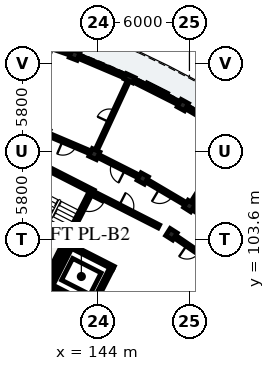
"""IFC4 building model, lengths in metres.
Left out: names, types, materials, properties, quantities, classifications, styles, units other than length and angle.
Written with IfcOpenShell. Run it as: python <this file> out.ifc"""

import sys

from ifc_helpers import new_model, si_unit, direction, frame, frame_2d, origin, origin_2d, place, context, subcontext, project, spatial, rectangle, extrude, element, fill, save


model = new_model("IFC4")
c1 = context("Model", 3, precision=1e-05, world=origin(), true_north=direction((0.0, 1.0)))
c2 = subcontext(c1, "Body", "Model", "MODEL_VIEW")
j1 = project(units=[si_unit("LENGTHUNIT", "METRE"), si_unit("PLANEANGLEUNIT", "RADIAN")], contexts=[c1])
p1 = place(None, origin())
s1 = spatial("IfcSite", under=j1, at=p1, CompositionType="ELEMENT")
p2 = place(p1, origin())
s2 = spatial("IfcBuilding", under=s1, at=p2, CompositionType="ELEMENT")
p3 = place(p2, frame((0.0, 0.0, 15.56)))
s3 = spatial("IfcBuildingStorey", under=s2, at=p3, CompositionType="ELEMENT", Elevation=15.56)
p4 = place(p3, frame((140.629, 108.307, 0.0), z_axis=(0.0, 0.0, 1.0), x_axis=(0.891032414707, -0.453939683153, 0.0)))
e1 = element("IfcWall", 1, at=p4, inside=s3, PredefinedType="SHEAR", context=c2, shape_type="SweptSolid", body=[
    extrude(rectangle(XDim=3.42, YDim=0.25, at=frame_2d((1.71, 0.0))), origin(), (0.0, 0.0, 1.0), 3.11),
])
p5 = place(p3, frame((143.509, 106.699, 0.0), z_axis=(0.0, 0.0, 1.0), x_axis=(-0.453992276384, -0.891005618941, 0.0)))
e2 = element("IfcWall", 2, at=p5, inside=s3, PredefinedType="SHEAR", context=c2, shape_type="SweptSolid", body=[
    extrude(rectangle(XDim=6.6, YDim=0.25, at=frame_2d((3.3, 0.0))), origin(), (0.0, 0.0, 1.0), 3.11),
])
p6 = place(p5, frame((0.22, 0.0, 0.0)))
e3 = element("IfcOpeningElement", 3, at=p6, cuts=e2, PredefinedType="OPENING", context=c2, shape_type="SweptSolid", body=[
    extrude(rectangle(XDim=1.05, YDim=2.15, at=frame_2d((0.525, 1.075))), frame((0.0, 0.135, 0.0), z_axis=(0.0, -1.0, 0.0), x_axis=(1.0, 0.0, 0.0)), (0.0, 0.0, 1.0), 0.27),
])
p7 = place(p3, frame((142.103, 103.224, 0.0), z_axis=(0.0, 0.0, 1.0), x_axis=(0.891001200497, -0.454000947921, 0.0)))
e4 = element("IfcWall", 4, at=p7, inside=s3, PredefinedType="SHEAR", context=c2, shape_type="SweptSolid", body=[
    extrude(rectangle(XDim=3.26, YDim=0.23, at=frame_2d((1.63, 0.0))), origin(), (0.0, 0.0, 1.0), 3.11),
])
p8 = place(p7, frame((0.9, 0.0, 0.0)))
e5 = element("IfcOpeningElement", 5, at=p8, cuts=e4, PredefinedType="OPENING", context=c2, shape_type="SweptSolid", body=[
    extrude(rectangle(XDim=1.0, YDim=2.15, at=frame_2d((0.5, 1.075))), frame((0.0, 0.125, 0.0), z_axis=(0.0, -1.0, 0.0), x_axis=(1.0, 0.0, 0.0)), (0.0, 0.0, 1.0), 0.25),
])
p9 = place(p3, frame((140.772, 100.613, 0.0), z_axis=(0.0, 0.0, 1.0), x_axis=(0.891016635648, -0.453970654337, 0.0)))
e6 = element("IfcWall", 6, at=p9, inside=s3, PredefinedType="SHEAR", context=c2, shape_type="SweptSolid", body=[
    extrude(rectangle(XDim=3.26, YDim=0.23, at=frame_2d((1.63, 0.0))), origin(), (0.0, 0.0, 1.0), 3.11),
])
for number, where, z_axis, x_axis in (
    (7, (142.153, 103.069, 0.0), (0.0, 0.0, 1.0), (-0.454, -0.891, 0.0)),
    (8, (144.853, 101.694, 0.0), (0.0, 0.0, 1.0), (-0.454, -0.891, 0.0)),
):
    element("IfcWall", number, at=place(p3, frame(where, z_axis=z_axis, x_axis=x_axis)), inside=s3, PredefinedType="SHEAR", context=c2, shape_type="SweptSolid", body=[
        extrude(rectangle(XDim=2.7, YDim=0.23, at=frame_2d((1.35, 0.0))), origin(), (0.0, 0.0, 1.0), 3.11),
    ])
for number, where, z_axis, x_axis in (
    (9, (148.817, 103.957, 0.0), (0.0, 0.0, 1.0), (0.536, 0.844, 0.0)),
    (10, (149.997, 105.813, 0.0), (0.0, 0.0, 1.0), (0.536, 0.844, 0.0)),
    (11, (146.928, 107.625, 0.0), (0.0, 0.0, 1.0), (0.48, 0.877, 0.0)),
    (12, (149.567, 112.451, 0.0), (0.0, 0.0, 1.0), (0.48, 0.877, 0.0)),
    (13, (143.748, 109.23, 0.0), (0.0, 0.0, 1.0), (0.421, 0.907, 0.0)),
):
    element("IfcColumn", number, at=place(p3, frame(where, z_axis=z_axis, x_axis=x_axis)), inside=s3, PredefinedType="COLUMN", context=c2, shape_type="SweptSolid", body=[
        extrude(rectangle(XDim=0.55, YDim=0.55, at=origin_2d()), origin(), (0.0, 0.0, 1.0), 3.11),
    ])
p10 = place(p3, frame((146.062, 114.219, 0.0), z_axis=(0.0, 0.0, 1.0), x_axis=(0.420859860775, 0.907125668024, 0.0)))
e14 = element("IfcColumn", 14, at=p10, inside=s3, PredefinedType="PILASTER", context=c2, shape_type="SweptSolid", body=[
    extrude(rectangle(XDim=0.38, YDim=0.62, at=origin_2d()), origin(), (0.0, 0.0, 1.0), 3.11),
])
p11 = place(p3, frame((142.448, 115.753, 0.0), z_axis=(0.0, 0.0, 1.0), x_axis=(0.36017767415, 0.932883724289, 0.0)))
e15 = element("IfcColumn", 15, at=p11, inside=s3, PredefinedType="COLUMN", context=c2, shape_type="SweptSolid", body=[
    extrude(rectangle(XDim=0.55, YDim=0.55, at=origin_2d()), origin(), (0.0, 0.0, 1.0), 3.11),
])
p12 = place(p3, frame((152.81, 110.536, 0.0), z_axis=(0.0, 0.0, 1.0), x_axis=(-0.861136297738, 0.508374150324, 0.0)))
e16 = element("IfcWall", 16, at=p12, inside=s3, PredefinedType="SOLIDWALL", context=c2, shape_type="SweptSolid", body=[
    extrude(rectangle(XDim=3.521, YDim=0.24, at=frame_2d((1.76, 0.0))), origin(), (0.0, 0.0, 1.0), 2.355),
])
p13 = place(p12, frame((1.035, 0.0, 0.35)))
e17 = element("IfcOpeningElement", 17, at=p13, cuts=e16, PredefinedType="OPENING", context=c2, shape_type="SweptSolid", body=[
    extrude(rectangle(XDim=1.45, YDim=1.7, at=frame_2d((0.725, 0.85))), frame((0.0, 0.13, 0.0), z_axis=(0.0, -1.0, 0.0), x_axis=(1.0, 0.0, 0.0)), (0.0, 0.0, 1.0), 0.26),
])
p14 = place(p3, frame((149.348, 112.561, 0.0), z_axis=(0.0, 0.0, 1.0), x_axis=(-0.892756700232, 0.450539092855, 0.0)))
e18 = element("IfcWall", 18, at=p14, inside=s3, PredefinedType="SOLIDWALL", context=c2, shape_type="SweptSolid", body=[
    extrude(rectangle(XDim=3.521, YDim=0.24, at=frame_2d((1.76, 0.0))), origin(), (0.0, 0.0, 1.0), 2.355),
])
p15 = place(p14, frame((0.96, 0.0, 0.35)))
e19 = element("IfcOpeningElement", 19, at=p15, cuts=e18, PredefinedType="OPENING", context=c2, shape_type="SweptSolid", body=[
    extrude(rectangle(XDim=1.6, YDim=1.75, at=frame_2d((0.8, 0.875))), frame((0.0, 0.13, 0.0), z_axis=(0.0, -1.0, 0.0), x_axis=(1.0, 0.0, 0.0)), (0.0, 0.0, 1.0), 0.26),
])
p16 = place(p3, frame((145.915, 114.282, 0.0), z_axis=(0.0, 0.0, 1.0), x_axis=(-0.920502438884, 0.390736816807, 0.0)))
e20 = element("IfcWall", 20, at=p16, inside=s3, PredefinedType="SOLIDWALL", context=c2, shape_type="SweptSolid", body=[
    extrude(rectangle(XDim=3.521, YDim=0.24, at=frame_2d((1.76, 0.0))), origin(), (0.0, 0.0, 1.0), 2.355),
])
p17 = place(p16, frame((0.885, 0.0, 0.35)))
e21 = element("IfcOpeningElement", 21, at=p17, cuts=e20, PredefinedType="OPENING", context=c2, shape_type="SweptSolid", body=[
    extrude(rectangle(XDim=1.75, YDim=1.85, at=frame_2d((0.875, 0.925))), frame((0.0, 0.13, 0.0), z_axis=(0.0, -1.0, 0.0), x_axis=(1.0, 0.0, 0.0)), (0.0, 0.0, 1.0), 0.26),
])
p18 = place(p3, frame((142.217, 115.834, 0.0), z_axis=(0.0, 0.0, 1.0), x_axis=(-0.944267366677, 0.329179495455, 0.0)))
e22 = element("IfcWall", 22, at=p18, inside=s3, PredefinedType="SOLIDWALL", context=c2, shape_type="SweptSolid", body=[
    extrude(rectangle(XDim=3.521, YDim=0.24, at=frame_2d((1.76, 0.0))), origin(), (0.0, 0.0, 1.0), 2.355),
])
p19 = place(p18, frame((1.25, 0.0, 0.0)))
e23 = element("IfcOpeningElement", 23, at=p19, cuts=e22, PredefinedType="OPENING", context=c2, shape_type="SweptSolid", body=[
    extrude(rectangle(XDim=1.02, YDim=2.14, at=frame_2d((0.51, 1.07))), frame((0.0, 0.13, 0.0), z_axis=(0.0, -1.0, 0.0), x_axis=(1.0, 0.0, 0.0)), (0.0, 0.0, 1.0), 0.26),
])
p20 = place(p3, frame((143.625, 106.696, 0.0), z_axis=(0.0, 0.0, 1.0), x_axis=(0.891003372311, -0.453996685595, 0.0)))
e24 = element("IfcWall", 24, at=p20, inside=s3, PredefinedType="PARTITIONING", context=c2, shape_type="SweptSolid", body=[
    extrude(rectangle(XDim=4.9, YDim=0.22, at=frame_2d((2.45, 0.0))), origin(), (0.0, 0.0, 1.0), 2.34),
])
p21 = place(p20, frame((1.95, 0.0, 0.0)))
e25 = element("IfcOpeningElement", 25, at=p21, cuts=e24, PredefinedType="OPENING", context=c2, shape_type="SweptSolid", body=[
    extrude(rectangle(XDim=0.98, YDim=2.14, at=frame_2d((0.49, 1.07))), frame((0.0, 0.12, 0.0), z_axis=(0.0, -1.0, 0.0), x_axis=(1.0, 0.0, 0.0)), (0.0, 0.0, 1.0), 0.24),
])
p22 = place(p3, frame((152.65, 104.001, 0.0), z_axis=(0.0, 0.0, 1.0), x_axis=(-0.825779671787, 0.563992848947, 0.0)))
e26 = element("IfcWall", 26, at=p22, inside=s3, PredefinedType="PARTITIONING", context=c2, shape_type="SweptSolid", body=[
    extrude(rectangle(XDim=2.863, YDim=0.205, at=frame_2d((1.432, 0.0))), origin(), (0.0, 0.0, 1.0), 2.37),
])
p23 = place(p22, frame((0.967, 0.0, 0.0)))
e27 = element("IfcOpeningElement", 27, at=p23, cuts=e26, PredefinedType="OPENING", context=c2, shape_type="SweptSolid", body=[
    extrude(rectangle(XDim=0.93, YDim=2.12, at=frame_2d((0.465, 1.06))), frame((0.0, 0.113, 0.0), z_axis=(0.0, -1.0, 0.0), x_axis=(1.0, 0.0, 0.0)), (0.0, 0.0, 1.0), 0.225),
])
p24 = place(p3, frame((151.35, 102.226, 0.0), z_axis=(0.0, 0.0, 1.0), x_axis=(-0.825752009056, 0.56403334967, 0.0)))
e28 = element("IfcWall", 28, at=p24, inside=s3, PredefinedType="PARTITIONING", context=c2, shape_type="SweptSolid", body=[
    extrude(rectangle(XDim=2.718, YDim=0.205, at=frame_2d((1.359, 0.0))), origin(), (0.0, 0.0, 1.0), 2.37),
])
p25 = place(p24, frame((0.894, 0.0, 0.0)))
e29 = element("IfcOpeningElement", 29, at=p25, cuts=e28, PredefinedType="OPENING", context=c2, shape_type="SweptSolid", body=[
    extrude(rectangle(XDim=0.93, YDim=2.12, at=frame_2d((0.465, 1.06))), frame((0.0, 0.113, 0.0), z_axis=(0.0, -1.0, 0.0), x_axis=(1.0, 0.0, 0.0)), (0.0, 0.0, 1.0), 0.225),
])
p26 = place(p3, frame((150.211, 106.151, 0.0), z_axis=(0.0, 0.0, 1.0), x_axis=(0.536492262982, 0.843905238614, 0.0)))
e30 = element("IfcWall", 30, at=p26, inside=s3, PredefinedType="PARTITIONING", context=c2, shape_type="SweptSolid", body=[
    extrude(rectangle(XDim=4.7, YDim=0.125, at=frame_2d((2.35, 0.0))), origin(), (0.0, 0.0, 1.0), 2.37),
])
p27 = place(p26, frame((1.915, 0.0, 0.0)))
e31 = element("IfcOpeningElement", 31, at=p27, cuts=e30, PredefinedType="OPENING", context=c2, shape_type="SweptSolid", body=[
    extrude(rectangle(XDim=0.87, YDim=2.08, at=frame_2d((0.435, 1.04))), frame((0.0, 0.073, 0.0), z_axis=(0.0, -1.0, 0.0), x_axis=(1.0, 0.0, 0.0)), (0.0, 0.0, 1.0), 0.145),
])
p28 = place(p3, frame((149.695, 105.991, 0.0), z_axis=(0.0, 0.0, 1.0), x_axis=(-0.861113214678, 0.508413248753, 0.0)))
e32 = element("IfcWall", 32, at=p28, inside=s3, PredefinedType="PARTITIONING", context=c2, shape_type="SweptSolid", body=[
    extrude(rectangle(XDim=2.863, YDim=0.205, at=frame_2d((1.432, 0.0))), origin(), (0.0, 0.0, 1.0), 2.37),
])
p29 = place(p28, frame((0.937, 0.0, 0.0)))
e33 = element("IfcOpeningElement", 33, at=p29, cuts=e32, PredefinedType="OPENING", context=c2, shape_type="SweptSolid", body=[
    extrude(rectangle(XDim=0.99, YDim=2.16, at=frame_2d((0.495, 1.08))), frame((0.0, 0.113, 0.0), z_axis=(0.0, -1.0, 0.0), x_axis=(1.0, 0.0, 0.0)), (0.0, 0.0, 1.0), 0.225),
])
p30 = place(p3, frame((146.616, 107.782, 0.0), z_axis=(0.0, 0.0, 1.0), x_axis=(-0.89273239336, 0.450587254419, 0.0)))
e34 = element("IfcWall", 34, at=p30, inside=s3, PredefinedType="PARTITIONING", context=c2, shape_type="SweptSolid", body=[
    extrude(rectangle(XDim=2.863, YDim=0.205, at=frame_2d((1.432, 0.0))), origin(), (0.0, 0.0, 1.0), 2.37),
])
p31 = place(p30, frame((0.947, 0.0, 0.0)))
e35 = element("IfcOpeningElement", 35, at=p31, cuts=e34, PredefinedType="OPENING", context=c2, shape_type="SweptSolid", body=[
    extrude(rectangle(XDim=0.97, YDim=2.15, at=frame_2d((0.485, 1.075))), frame((0.0, 0.113, 0.0), z_axis=(0.0, -1.0, 0.0), x_axis=(1.0, 0.0, 0.0)), (0.0, 0.0, 1.0), 0.225),
])
p32 = place(p3, frame((143.916, 109.593, 0.0), z_axis=(0.0, 0.0, 1.0), x_axis=(0.420862519045, 0.907124434718, 0.0)))
e36 = element("IfcWall", 36, at=p32, inside=s3, PredefinedType="PLUMBINGWALL", context=c2, shape_type="SweptSolid", body=[
    extrude(rectangle(XDim=4.7, YDim=0.15, at=frame_2d((2.35, 0.0))), origin(), (0.0, 0.0, 1.0), 2.37),
])
p33 = place(p32, frame((1.92, 0.0, 0.0)))
e37 = element("IfcOpeningElement", 37, at=p33, cuts=e36, PredefinedType="OPENING", context=c2, shape_type="SweptSolid", body=[
    extrude(rectangle(XDim=0.86, YDim=2.06, at=frame_2d((0.43, 1.03))), frame((0.0, 0.085, 0.0), z_axis=(0.0, -1.0, 0.0), x_axis=(1.0, 0.0, 0.0)), (0.0, 0.0, 1.0), 0.17),
])
p34 = place(p3, frame((143.425, 109.367, 0.0), z_axis=(0.0, 0.0, 1.0), x_axis=(-0.920511160294, 0.390716270168, 0.0)))
e38 = element("IfcWall", 38, at=p34, inside=s3, PredefinedType="PARTITIONING", context=c2, shape_type="SweptSolid", body=[
    extrude(rectangle(XDim=2.863, YDim=0.205, at=frame_2d((1.432, 0.0))), origin(), (0.0, 0.0, 1.0), 2.37),
])
p35 = place(p34, frame((0.957, 0.0, 0.0)))
e39 = element("IfcOpeningElement", 39, at=p35, cuts=e38, PredefinedType="OPENING", context=c2, shape_type="SweptSolid", body=[
    extrude(rectangle(XDim=0.95, YDim=2.13, at=frame_2d((0.475, 1.065))), frame((0.0, 0.113, 0.0), z_axis=(0.0, -1.0, 0.0), x_axis=(1.0, 0.0, 0.0)), (0.0, 0.0, 1.0), 0.225),
])
p36 = place(p15, origin())
e40 = element("IfcWindow", 40, at=p36, inside=s3, PartitioningType="SINGLE_PANEL", PredefinedType="WINDOW", context=c2, shape_type="SweptSolid", body=[
    extrude(rectangle(XDim=1.6, YDim=1.75, at=frame_2d((0.8, 0.875))), frame((0.0, 0.03, 0.0), z_axis=(0.0, -1.0, 0.0), x_axis=(1.0, 0.0, 0.0)), (0.0, 0.0, 1.0), 0.06),
])
fill(e19, e40)
p37 = place(p17, origin())
e41 = element("IfcWindow", 41, at=p37, inside=s3, PartitioningType="SINGLE_PANEL", PredefinedType="WINDOW", context=c2, shape_type="SweptSolid", body=[
    extrude(rectangle(XDim=1.75, YDim=1.85, at=frame_2d((0.875, 0.925))), frame((0.0, 0.03, 0.0), z_axis=(0.0, -1.0, 0.0), x_axis=(1.0, 0.0, 0.0)), (0.0, 0.0, 1.0), 0.06),
])
fill(e21, e41)
p38 = place(p6, origin())
e42 = element("IfcDoor", 42, at=p38, inside=s3, OperationType="SINGLE_SWING_LEFT", PredefinedType="DOOR", context=c2, shape_type="SweptSolid", body=[
    extrude(rectangle(XDim=1.05, YDim=2.15, at=frame_2d((0.525, 1.075))), frame((0.0, 0.025, 0.0), z_axis=(0.0, -1.0, 0.0), x_axis=(1.0, 0.0, 0.0)), (0.0, 0.0, 1.0), 0.05),
])
fill(e3, e42)
p39 = place(p8, origin())
e43 = element("IfcDoor", 43, at=p39, inside=s3, OperationType="DOUBLE_DOOR_SLIDING", PredefinedType="DOOR", context=c2, shape_type="SweptSolid", body=[
    extrude(rectangle(XDim=1.0, YDim=2.15, at=frame_2d((0.5, 1.075))), frame((0.0, 0.025, 0.0), z_axis=(0.0, -1.0, 0.0), x_axis=(1.0, 0.0, 0.0)), (0.0, 0.0, 1.0), 0.05),
])
fill(e5, e43)
p40 = place(p21, origin())
e44 = element("IfcDoor", 44, at=p40, inside=s3, OperationType="SINGLE_SWING_LEFT", PredefinedType="DOOR", context=c2, shape_type="SweptSolid", body=[
    extrude(rectangle(XDim=0.98, YDim=2.14, at=frame_2d((0.49, 1.07))), frame((0.0, 0.025, 0.0), z_axis=(0.0, -1.0, 0.0), x_axis=(1.0, 0.0, 0.0)), (0.0, 0.0, 1.0), 0.05),
])
fill(e25, e44)
p41 = place(p25, origin())
e45 = element("IfcDoor", 45, at=p41, inside=s3, OperationType="SINGLE_SWING_RIGHT", PredefinedType="DOOR", context=c2, shape_type="SweptSolid", body=[
    extrude(rectangle(XDim=0.93, YDim=2.12, at=frame_2d((0.465, 1.06))), frame((0.0, 0.025, 0.0), z_axis=(0.0, -1.0, 0.0), x_axis=(1.0, 0.0, 0.0)), (0.0, 0.0, 1.0), 0.05),
])
fill(e29, e45)
p42 = place(p29, origin())
e46 = element("IfcDoor", 46, at=p42, inside=s3, OperationType="SINGLE_SWING_RIGHT", PredefinedType="DOOR", context=c2, shape_type="SweptSolid", body=[
    extrude(rectangle(XDim=0.99, YDim=2.16, at=frame_2d((0.495, 1.08))), frame((0.0, 0.025, 0.0), z_axis=(0.0, -1.0, 0.0), x_axis=(1.0, 0.0, 0.0)), (0.0, 0.0, 1.0), 0.05),
])
fill(e33, e46)
p43 = place(p31, origin())
e47 = element("IfcDoor", 47, at=p43, inside=s3, OperationType="SINGLE_SWING_LEFT", PredefinedType="DOOR", context=c2, shape_type="SweptSolid", body=[
    extrude(rectangle(XDim=0.97, YDim=2.15, at=frame_2d((0.485, 1.075))), frame((0.0, 0.025, 0.0), z_axis=(0.0, -1.0, 0.0), x_axis=(1.0, 0.0, 0.0)), (0.0, 0.0, 1.0), 0.05),
])
fill(e35, e47)
p44 = place(p33, origin())
e48 = element("IfcDoor", 48, at=p44, inside=s3, OperationType="SINGLE_SWING_LEFT", PredefinedType="DOOR", context=c2, shape_type="SweptSolid", body=[
    extrude(rectangle(XDim=0.86, YDim=2.06, at=frame_2d((0.43, 1.03))), frame((0.0, 0.025, 0.0), z_axis=(0.0, -1.0, 0.0), x_axis=(1.0, 0.0, 0.0)), (0.0, 0.0, 1.0), 0.05),
])
fill(e37, e48)
p45 = place(p35, origin())
e49 = element("IfcDoor", 49, at=p45, inside=s3, OperationType="SINGLE_SWING_RIGHT", PredefinedType="DOOR", context=c2, shape_type="SweptSolid", body=[
    extrude(rectangle(XDim=0.95, YDim=2.13, at=frame_2d((0.475, 1.065))), frame((0.0, 0.025, 0.0), z_axis=(0.0, -1.0, 0.0), x_axis=(1.0, 0.0, 0.0)), (0.0, 0.0, 1.0), 0.05),
])
fill(e39, e49)
save(model, sys.argv[1])
